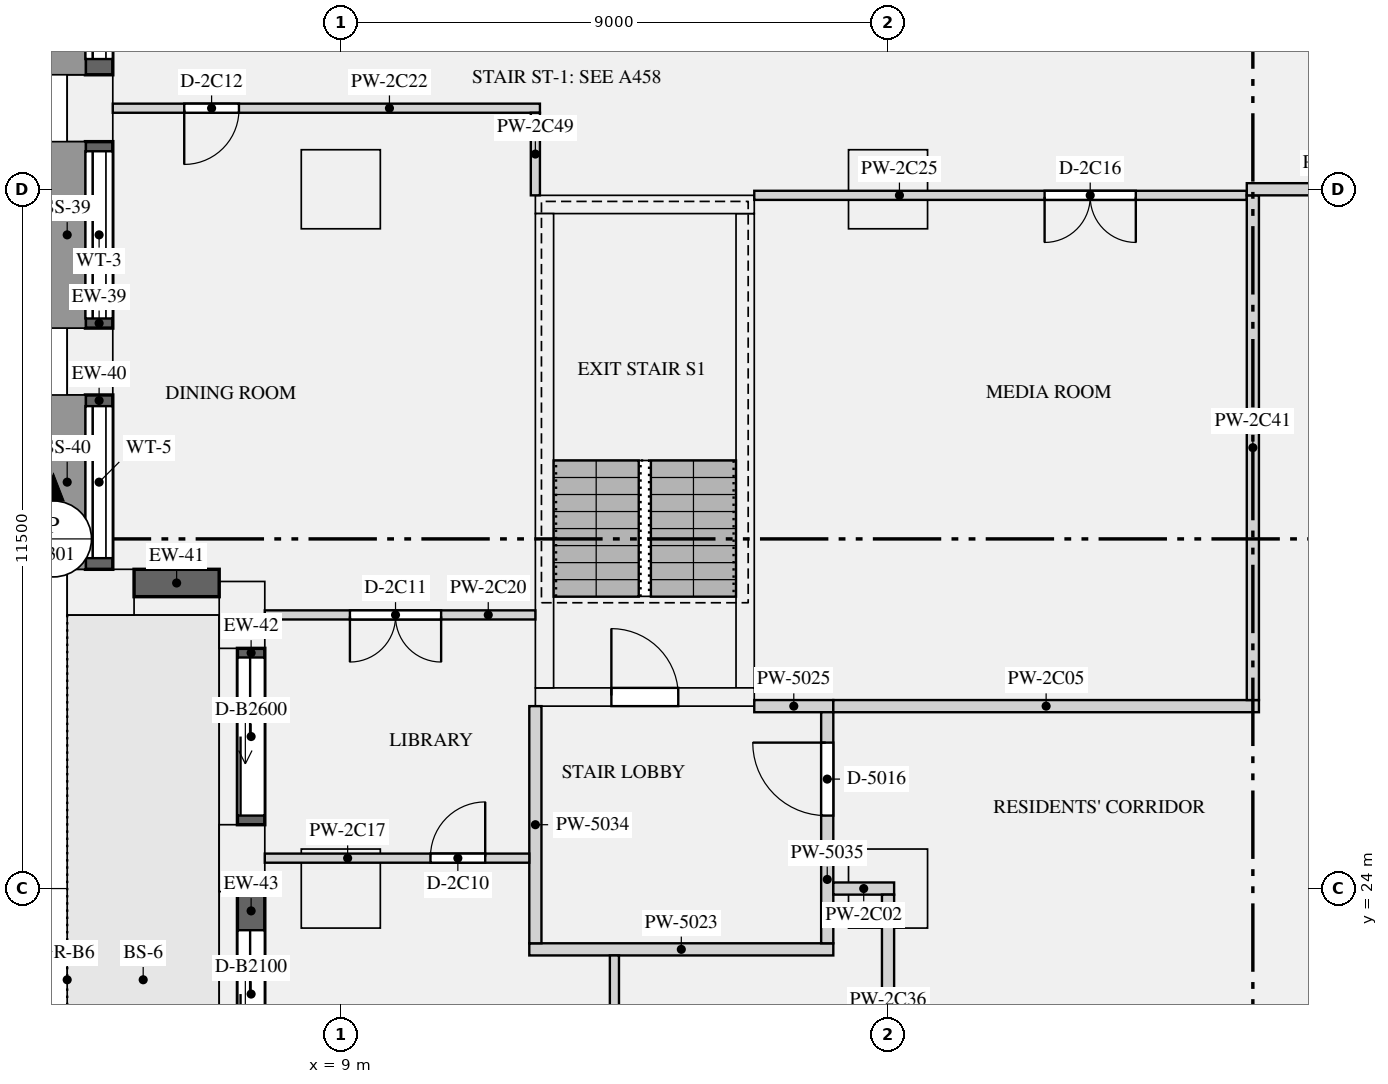
"""IFC4 building model, lengths in metres.
Left out: names, types, materials, properties, quantities, classifications, styles, units other than length and angle.
Written with IfcOpenShell. Run it as: python <this file> out.ifc"""

import sys

from ifc_helpers import new_model, si_unit, direction, frame, frame_2d, origin, origin_2d, place, context, subcontext, project, spatial, rectangle, extrude, element, fill, save


model = new_model("IFC4")
c1 = context("Model", 3, precision=1e-05, world=origin(), true_north=direction((0.0, 1.0)))
c2 = subcontext(c1, "Body", "Model", "MODEL_VIEW")
j1 = project(units=[si_unit("LENGTHUNIT", "METRE"), si_unit("PLANEANGLEUNIT", "RADIAN")], contexts=[c1])
p1 = place(None, origin())
s1 = spatial("IfcSite", under=j1, at=p1, CompositionType="ELEMENT")
p2 = place(p1, origin())
s2 = spatial("IfcBuilding", under=s1, at=p2, CompositionType="ELEMENT")
p3 = place(p2, frame((0.0, 0.0, 102.45)))
s3 = spatial("IfcBuildingStorey", under=s2, at=p3, CompositionType="ELEMENT", Elevation=102.45)
for number, where, z_axis, x_axis in (
    (1, (4.875, 36.833, 0.0), (0.0, 0.0, 1.0), (0.0, -1.0, 0.0)),
    (2, (4.875, 32.667, 0.0), (0.0, 0.0, 1.0), (0.0, -1.0, 0.0)),
    (3, (5.05, 28.875, 0.0), (0.0, 0.0, 1.0), (1.0, 0.0, 0.0)),
    (4, (7.375, 28.5, 0.0), (0.0, 0.0, 1.0), (0.0, -1.0, 0.0)),
    (5, (7.375, 24.5, 0.0), (0.0, 0.0, 1.0), (0.0, -1.0, 0.0)),
):
    element("IfcColumn", number, at=place(p3, frame(where, z_axis=z_axis, x_axis=x_axis)), inside=s3, PredefinedType="USERDEFINED", context=c2, shape_type="SweptSolid", body=[
        extrude(rectangle(XDim=1.1, YDim=0.75, at=origin_2d()), origin(), (0.0, 0.0, 1.0), 3.15),
    ])
for number, where, z_axis, x_axis in (
    (6, (9.0, 24.0, 0.0), (0.0, 0.0, 1.0), (1.0, 0.0, 0.0)),
    (7, (18.0, 24.0, 0.0), (0.0, 0.0, 1.0), (1.0, 0.0, 0.0)),
    (8, (9.0, 35.5, 0.0), (0.0, 0.0, 1.0), (1.0, 0.0, 0.0)),
    (9, (18.0, 35.5, 0.0), (0.0, 0.0, 1.0), (1.0, 0.0, 0.0)),
):
    element("IfcColumn", number, at=place(p3, frame(where, z_axis=z_axis, x_axis=x_axis)), inside=s3, PredefinedType="COLUMN", context=c2, shape_type="SweptSolid", body=[
        extrude(rectangle(XDim=1.3, YDim=1.3, at=origin_2d()), origin(), (0.0, 0.0, 1.0), 3.15),
    ])
p4 = place(p3, frame((12.2, 27.15, 0.0), z_axis=(0.0, 0.0, 1.0), x_axis=(1.0, 0.0, 0.0)))
e10 = element("IfcWall", 10, at=p4, inside=s3, PredefinedType="SHEAR", context=c2, shape_type="SweptSolid", body=[
    extrude(rectangle(XDim=3.6, YDim=0.3, at=frame_2d((1.8, 0.0))), origin(), (0.0, 0.0, 1.0), 3.15),
])
p5 = place(p4, frame((1.25, 0.0, 0.0)))
e11 = element("IfcOpeningElement", 11, at=p5, cuts=e10, PredefinedType="OPENING", context=c2, shape_type="SweptSolid", body=[
    extrude(rectangle(XDim=1.1, YDim=2.1, at=frame_2d((0.55, 1.05))), frame((0.0, 0.16, 0.0), z_axis=(0.0, -1.0, 0.0), x_axis=(1.0, 0.0, 0.0)), (0.0, 0.0, 1.0), 0.32),
])
p6 = place(p3, frame((12.2, 35.25, 0.0), z_axis=(0.0, 0.0, 1.0), x_axis=(1.0, 0.0, 0.0)))
e12 = element("IfcWall", 12, at=p6, inside=s3, PredefinedType="SHEAR", context=c2, shape_type="SweptSolid", body=[
    extrude(rectangle(XDim=3.6, YDim=0.3, at=frame_2d((1.8, 0.0))), origin(), (0.0, 0.0, 1.0), 3.15),
])
for number, where, z_axis, x_axis in (
    (13, (12.35, 27.3, 0.0), (0.0, 0.0, 1.0), (0.0, 1.0, 0.0)),
    (14, (15.65, 27.3, 0.0), (0.0, 0.0, 1.0), (0.0, 1.0, 0.0)),
):
    element("IfcWall", number, at=place(p3, frame(where, z_axis=z_axis, x_axis=x_axis)), inside=s3, PredefinedType="SHEAR", context=c2, shape_type="SweptSolid", body=[
        extrude(rectangle(XDim=7.8, YDim=0.3, at=frame_2d((3.9, 0.0))), origin(), (0.0, 0.0, 1.0), 3.15),
    ])
p7 = place(p3, frame((5.025, 39.9, 0.9), z_axis=(0.0, 0.0, 1.0), x_axis=(0.0, -1.0, 0.0)))
e15 = element("IfcWall", 15, at=p7, inside=s3, PredefinedType="SOLIDWALL", context=c2, shape_type="SweptSolid", body=[
    extrude(rectangle(XDim=2.517, YDim=0.45, at=frame_2d((1.258, 0.0))), origin(), (0.0, 0.0, 1.0), 1.93),
])
p8 = place(p7, frame((0.259, 0.0, 0.15)))
e16 = element("IfcOpeningElement", 16, at=p8, cuts=e15, PredefinedType="OPENING", context=c2, shape_type="SweptSolid", body=[
    extrude(rectangle(XDim=2.0, YDim=1.5, at=frame_2d((1.0, 0.75))), frame((0.0, 0.235, 0.0), z_axis=(0.0, -1.0, 0.0), x_axis=(1.0, 0.0, 0.0)), (0.0, 0.0, 1.0), 0.47),
])
p9 = place(p3, frame((5.025, 36.283, 0.9), z_axis=(0.0, 0.0, 1.0), x_axis=(0.0, -1.0, 0.0)))
e17 = element("IfcWall", 17, at=p9, inside=s3, PredefinedType="SOLIDWALL", context=c2, shape_type="SweptSolid", body=[
    extrude(rectangle(XDim=3.066, YDim=0.45, at=frame_2d((1.533, 0.0))), origin(), (0.0, 0.0, 1.0), 1.93),
])
p10 = place(p9, frame((0.158, 0.0, 0.15)))
e18 = element("IfcOpeningElement", 18, at=p10, cuts=e17, PredefinedType="OPENING", context=c2, shape_type="SweptSolid", body=[
    extrude(rectangle(XDim=2.75, YDim=1.5, at=frame_2d((1.375, 0.75))), frame((0.0, 0.235, 0.0), z_axis=(0.0, -1.0, 0.0), x_axis=(1.0, 0.0, 0.0)), (0.0, 0.0, 1.0), 0.47),
])
p11 = place(p3, frame((5.025, 32.117, 0.9), z_axis=(0.0, 0.0, 1.0), x_axis=(0.0, -1.0, 0.0)))
e19 = element("IfcWall", 19, at=p11, inside=s3, PredefinedType="SOLIDWALL", context=c2, shape_type="SweptSolid", body=[
    extrude(rectangle(XDim=2.867, YDim=0.45, at=frame_2d((1.434, 0.0))), origin(), (0.0, 0.0, 1.0), 1.93),
])
p12 = place(p11, frame((0.184, 0.0, 0.15)))
e20 = element("IfcOpeningElement", 20, at=p12, cuts=e19, PredefinedType="OPENING", context=c2, shape_type="SweptSolid", body=[
    extrude(rectangle(XDim=2.5, YDim=1.5, at=frame_2d((1.25, 0.75))), frame((0.0, 0.235, 0.0), z_axis=(0.0, -1.0, 0.0), x_axis=(1.0, 0.0, 0.0)), (0.0, 0.0, 1.0), 0.47),
])
p13 = place(p3, frame((5.6, 29.025, 0.9), z_axis=(0.0, 0.0, 1.0), x_axis=(1.0, 0.0, 0.0)))
e21 = element("IfcWall", 21, at=p13, inside=s3, PredefinedType="SOLIDWALL", context=c2, shape_type="SweptSolid", body=[
    extrude(rectangle(XDim=1.4, YDim=0.45, at=frame_2d((0.7, 0.0))), origin(), (0.0, 0.0, 1.0), 1.93),
])
p14 = place(p3, frame((7.525, 27.95, 0.0), z_axis=(0.0, 0.0, 1.0), x_axis=(0.0, -1.0, 0.0)))
e22 = element("IfcWall", 22, at=p14, inside=s3, PredefinedType="SOLIDWALL", context=c2, shape_type="SweptSolid", body=[
    extrude(rectangle(XDim=2.9, YDim=0.45, at=frame_2d((1.45, 0.0))), origin(), (0.0, 0.0, 1.0), 2.83),
])
p15 = place(p14, frame((0.15, 0.0, 0.0)))
e23 = element("IfcOpeningElement", 23, at=p15, cuts=e22, PredefinedType="OPENING", context=c2, shape_type="SweptSolid", body=[
    extrude(rectangle(XDim=2.6, YDim=2.3, at=frame_2d((1.3, 1.15))), frame((0.0, 0.235, 0.0), z_axis=(0.0, -1.0, 0.0), x_axis=(1.0, 0.0, 0.0)), (0.0, 0.0, 1.0), 0.47),
])
p16 = place(p3, frame((7.525, 23.95, 0.0), z_axis=(0.0, 0.0, 1.0), x_axis=(0.0, -1.0, 0.0)))
e24 = element("IfcWall", 24, at=p16, inside=s3, PredefinedType="SOLIDWALL", context=c2, shape_type="SweptSolid", body=[
    extrude(rectangle(XDim=2.9, YDim=0.45, at=frame_2d((1.45, 0.0))), origin(), (0.0, 0.0, 1.0), 2.83),
])
p17 = place(p16, frame((0.635, 0.0, 0.0)))
e25 = element("IfcOpeningElement", 25, at=p17, cuts=e24, PredefinedType="OPENING", context=c2, shape_type="SweptSolid", body=[
    extrude(rectangle(XDim=2.1, YDim=2.3, at=frame_2d((1.05, 1.15))), frame((0.0, 0.235, 0.0), z_axis=(0.0, -1.0, 0.0), x_axis=(1.0, 0.0, 0.0)), (0.0, 0.0, 1.0), 0.47),
])
p18 = place(p3, frame((12.1, 23.0, 0.0), z_axis=(0.0, 0.0, 1.0), x_axis=(1.0, 0.0, 0.0)))
e26 = element("IfcWall", 26, at=p18, inside=s3, PredefinedType="PARTITIONING", context=c2, shape_type="SweptSolid", body=[
    extrude(rectangle(XDim=5.0, YDim=0.2, at=frame_2d((2.5, 0.0))), origin(), (0.0, 0.0, 1.0), 2.83),
])
p19 = place(p3, frame((15.8, 27.0, 0.0), z_axis=(0.0, 0.0, 1.0), x_axis=(1.0, 0.0, 0.0)))
e27 = element("IfcWall", 27, at=p19, inside=s3, PredefinedType="PARTITIONING", context=c2, shape_type="SweptSolid", body=[
    extrude(rectangle(XDim=1.3, YDim=0.2, at=frame_2d((0.65, 0.0))), origin(), (0.0, 0.0, 1.0), 2.83),
])
p20 = place(p3, frame((12.2, 23.1, 0.0), z_axis=(0.0, 0.0, 1.0), x_axis=(0.0, 1.0, 0.0)))
e28 = element("IfcWall", 28, at=p20, inside=s3, PredefinedType="PARTITIONING", context=c2, shape_type="SweptSolid", body=[
    extrude(rectangle(XDim=3.9, YDim=0.2, at=frame_2d((1.95, 0.0))), origin(), (0.0, 0.0, 1.0), 2.83),
])
p21 = place(p3, frame((17.0, 23.1, 0.0), z_axis=(0.0, 0.0, 1.0), x_axis=(0.0, 1.0, 0.0)))
e29 = element("IfcWall", 29, at=p21, inside=s3, PredefinedType="PARTITIONING", context=c2, shape_type="SweptSolid", body=[
    extrude(rectangle(XDim=3.8, YDim=0.2, at=frame_2d((1.9, 0.0))), origin(), (0.0, 0.0, 1.0), 2.83),
])
p22 = place(p21, frame((2.1, 0.0, 0.0)))
e30 = element("IfcOpeningElement", 30, at=p22, cuts=e29, PredefinedType="OPENING", context=c2, shape_type="SweptSolid", body=[
    extrude(rectangle(XDim=1.2, YDim=2.1, at=frame_2d((0.6, 1.05))), frame((0.0, 0.11, 0.0), z_axis=(0.0, -1.0, 0.0), x_axis=(1.0, 0.0, 0.0)), (0.0, 0.0, 1.0), 0.22),
])
p23 = place(p3, frame((17.1, 24.0, 0.0), z_axis=(0.0, 0.0, 1.0), x_axis=(1.0, 0.0, 0.0)))
e31 = element("IfcWall", 31, at=p23, inside=s3, PredefinedType="PARTITIONING", context=c2, shape_type="SweptSolid", body=[
    extrude(rectangle(XDim=1.0, YDim=0.2, at=frame_2d((0.5, 0.0))), origin(), (0.0, 0.0, 1.0), 2.83),
])
p24 = place(p3, frame((17.1, 27.0, 0.0), z_axis=(0.0, 0.0, 1.0), x_axis=(1.0, 0.0, 0.0)))
e32 = element("IfcWall", 32, at=p24, inside=s3, PredefinedType="PARTITIONING", context=c2, shape_type="SweptSolid", body=[
    extrude(rectangle(XDim=7.0, YDim=0.2, at=frame_2d((3.5, 0.0))), origin(), (0.0, 0.0, 1.0), 2.83),
])
p25 = place(p3, frame((23.9, 35.5, 0.0), z_axis=(0.0, 0.0, 1.0), x_axis=(1.0, 0.0, 0.0)))
e33 = element("IfcWall", 33, at=p25, inside=s3, PredefinedType="PARTITIONING", context=c2, shape_type="SweptSolid", body=[
    extrude(rectangle(XDim=3.1, YDim=0.2, at=frame_2d((1.55, 0.0))), origin(), (0.0, 0.0, 1.0), 2.83),
])
p26 = place(p3, frame((7.75, 24.5, 0.0), z_axis=(0.0, 0.0, 1.0), x_axis=(1.0, 0.0, 0.0)))
e34 = element("IfcWall", 34, at=p26, inside=s3, PredefinedType="PARTITIONING", context=c2, shape_type="SweptSolid", body=[
    extrude(rectangle(XDim=4.35, YDim=0.15, at=frame_2d((2.175, 0.0))), origin(), (0.0, 0.0, 1.0), 2.83),
])
p27 = place(p26, frame((2.725, 0.0, 0.0)))
e35 = element("IfcOpeningElement", 35, at=p27, cuts=e34, PredefinedType="OPENING", context=c2, shape_type="SweptSolid", body=[
    extrude(rectangle(XDim=0.9, YDim=2.1, at=frame_2d((0.45, 1.05))), frame((0.0, 0.085, 0.0), z_axis=(0.0, -1.0, 0.0), x_axis=(1.0, 0.0, 0.0)), (0.0, 0.0, 1.0), 0.17),
])
p28 = place(p3, frame((7.75, 28.5, 0.0), z_axis=(0.0, 0.0, 1.0), x_axis=(1.0, 0.0, 0.0)))
e36 = element("IfcWall", 36, at=p28, inside=s3, PredefinedType="PARTITIONING", context=c2, shape_type="SweptSolid", body=[
    extrude(rectangle(XDim=4.45, YDim=0.15, at=frame_2d((2.225, 0.0))), origin(), (0.0, 0.0, 1.0), 2.83),
])
p29 = place(p28, frame((1.4, 0.0, 0.0)))
e37 = element("IfcOpeningElement", 37, at=p29, cuts=e36, PredefinedType="OPENING", context=c2, shape_type="SweptSolid", body=[
    extrude(rectangle(XDim=1.5, YDim=2.1, at=frame_2d((0.75, 1.05))), frame((0.0, 0.085, 0.0), z_axis=(0.0, -1.0, 0.0), x_axis=(1.0, 0.0, 0.0)), (0.0, 0.0, 1.0), 0.17),
])
p30 = place(p3, frame((5.25, 36.833, 0.0), z_axis=(0.0, 0.0, 1.0), x_axis=(1.0, 0.0, 0.0)))
e38 = element("IfcWall", 38, at=p30, inside=s3, PredefinedType="PARTITIONING", context=c2, shape_type="SweptSolid", body=[
    extrude(rectangle(XDim=7.025, YDim=0.15, at=frame_2d((3.512, 0.0))), origin(), (0.0, 0.0, 1.0), 2.83),
])
p31 = place(p30, frame((1.175, 0.0, 0.0)))
e39 = element("IfcOpeningElement", 39, at=p31, cuts=e38, PredefinedType="OPENING", context=c2, shape_type="SweptSolid", body=[
    extrude(rectangle(XDim=0.9, YDim=2.1, at=frame_2d((0.45, 1.05))), frame((0.0, 0.085, 0.0), z_axis=(0.0, -1.0, 0.0), x_axis=(1.0, 0.0, 0.0)), (0.0, 0.0, 1.0), 0.17),
])
p32 = place(p3, frame((15.8, 35.4, 0.0), z_axis=(0.0, 0.0, 1.0), x_axis=(1.0, 0.0, 0.0)))
e40 = element("IfcWall", 40, at=p32, inside=s3, PredefinedType="PARTITIONING", context=c2, shape_type="SweptSolid", body=[
    extrude(rectangle(XDim=8.1, YDim=0.15, at=frame_2d((4.05, 0.0))), origin(), (0.0, 0.0, 1.0), 2.83),
])
p33 = place(p32, frame((4.775, 0.0, 0.0)))
e41 = element("IfcOpeningElement", 41, at=p33, cuts=e40, PredefinedType="OPENING", context=c2, shape_type="SweptSolid", body=[
    extrude(rectangle(XDim=1.5, YDim=2.1, at=frame_2d((0.75, 1.05))), frame((0.0, 0.085, 0.0), z_axis=(0.0, -1.0, 0.0), x_axis=(1.0, 0.0, 0.0)), (0.0, 0.0, 1.0), 0.17),
])
p34 = place(p3, frame((18.0, 16.1, 0.0), z_axis=(0.0, 0.0, 1.0), x_axis=(0.0, 1.0, 0.0)))
e42 = element("IfcWall", 42, at=p34, inside=s3, PredefinedType="PARTITIONING", context=c2, shape_type="SweptSolid", body=[
    extrude(rectangle(XDim=7.8, YDim=0.2, at=frame_2d((3.9, 0.0))), origin(), (0.0, 0.0, 1.0), 2.83),
])
p35 = place(p34, frame((2.35, 0.0, 0.0)))
e43 = element("IfcOpeningElement", 43, at=p35, cuts=e42, PredefinedType="OPENING", context=c2, shape_type="SweptSolid", body=[
    extrude(rectangle(XDim=1.1, YDim=2.1, at=frame_2d((0.55, 1.05))), frame((0.0, 0.11, 0.0), z_axis=(0.0, -1.0, 0.0), x_axis=(1.0, 0.0, 0.0)), (0.0, 0.0, 1.0), 0.22),
])
p36 = place(p3, frame((24.0, 27.1, 0.0), z_axis=(0.0, 0.0, 1.0), x_axis=(0.0, 1.0, 0.0)))
e44 = element("IfcWall", 44, at=p36, inside=s3, PredefinedType="PARTITIONING", context=c2, shape_type="SweptSolid", body=[
    extrude(rectangle(XDim=8.3, YDim=0.2, at=frame_2d((4.15, 0.0))), origin(), (0.0, 0.0, 1.0), 2.83),
])
p37 = place(p3, frame((13.5, 12.575, 0.0), z_axis=(0.0, 0.0, 1.0), x_axis=(0.0, 1.0, 0.0)))
e45 = element("IfcWall", 45, at=p37, inside=s3, PredefinedType="PARTITIONING", context=c2, shape_type="SweptSolid", body=[
    extrude(rectangle(XDim=10.325, YDim=0.15, at=frame_2d((5.163, 0.0))), origin(), (0.0, 0.0, 1.0), 2.83),
])
p38 = place(p37, frame((1.475, 0.0, 0.0)))
e46 = element("IfcOpeningElement", 46, at=p38, cuts=e45, PredefinedType="OPENING", context=c2, shape_type="SweptSolid", body=[
    extrude(rectangle(XDim=0.9, YDim=2.1, at=frame_2d((0.45, 1.05))), frame((0.0, 0.085, 0.0), z_axis=(0.0, -1.0, 0.0), x_axis=(1.0, 0.0, 0.0)), (0.0, 0.0, 1.0), 0.17),
])
p39 = place(p37, frame((6.45, 0.0, 0.0)))
e47 = element("IfcOpeningElement", 47, at=p39, cuts=e45, PredefinedType="OPENING", context=c2, shape_type="SweptSolid", body=[
    extrude(rectangle(XDim=1.5, YDim=2.1, at=frame_2d((0.75, 1.05))), frame((0.0, 0.085, 0.0), z_axis=(0.0, -1.0, 0.0), x_axis=(1.0, 0.0, 0.0)), (0.0, 0.0, 1.0), 0.17),
])
p40 = place(p3, frame((12.2, 35.4, 0.0), z_axis=(0.0, 0.0, 1.0), x_axis=(0.0, 1.0, 0.0)))
e48 = element("IfcWall", 48, at=p40, inside=s3, PredefinedType="PARTITIONING", context=c2, shape_type="SweptSolid", body=[
    extrude(rectangle(XDim=1.358, YDim=0.15, at=frame_2d((0.679, 0.0))), origin(), (0.0, 0.0, 1.0), 2.83),
])
p41 = place(p8, origin())
e49 = element("IfcWindow", 49, at=p41, inside=s3, PartitioningType="SINGLE_PANEL", PredefinedType="WINDOW", context=c2, shape_type="SweptSolid", body=[
    extrude(rectangle(XDim=2.0, YDim=1.5, at=frame_2d((1.0, 0.75))), frame((0.0, -0.065, 0.0), z_axis=(0.0, -1.0, 0.0), x_axis=(1.0, 0.0, 0.0)), (0.0, 0.0, 1.0), 0.06),
])
fill(e16, e49)
p42 = place(p10, origin())
e50 = element("IfcWindow", 50, at=p42, inside=s3, PartitioningType="SINGLE_PANEL", PredefinedType="WINDOW", context=c2, shape_type="SweptSolid", body=[
    extrude(rectangle(XDim=2.75, YDim=1.5, at=frame_2d((1.375, 0.75))), frame((0.0, -0.065, 0.0), z_axis=(0.0, -1.0, 0.0), x_axis=(1.0, 0.0, 0.0)), (0.0, 0.0, 1.0), 0.06),
])
fill(e18, e50)
p43 = place(p12, origin())
e51 = element("IfcWindow", 51, at=p43, inside=s3, PartitioningType="SINGLE_PANEL", PredefinedType="WINDOW", context=c2, shape_type="SweptSolid", body=[
    extrude(rectangle(XDim=2.5, YDim=1.5, at=frame_2d((1.25, 0.75))), frame((0.0, -0.065, 0.0), z_axis=(0.0, -1.0, 0.0), x_axis=(1.0, 0.0, 0.0)), (0.0, 0.0, 1.0), 0.06),
])
fill(e20, e51)
p44 = place(p15, origin())
e52 = element("IfcDoor", 52, at=p44, inside=s3, OperationType="SLIDING_TO_LEFT", PredefinedType="DOOR", context=c2, shape_type="SweptSolid", body=[
    extrude(rectangle(XDim=2.6, YDim=2.3, at=frame_2d((1.3, 1.15))), frame((0.0, -0.07, 0.0), z_axis=(0.0, -1.0, 0.0), x_axis=(1.0, 0.0, 0.0)), (0.0, 0.0, 1.0), 0.05),
])
fill(e23, e52)
p45 = place(p17, origin())
e53 = element("IfcDoor", 53, at=p45, inside=s3, OperationType="SLIDING_TO_LEFT", PredefinedType="DOOR", context=c2, shape_type="SweptSolid", body=[
    extrude(rectangle(XDim=2.1, YDim=2.3, at=frame_2d((1.05, 1.15))), frame((0.0, -0.07, 0.0), z_axis=(0.0, -1.0, 0.0), x_axis=(1.0, 0.0, 0.0)), (0.0, 0.0, 1.0), 0.05),
])
fill(e25, e53)
p46 = place(p5, origin())
e54 = element("IfcDoor", 54, at=p46, inside=s3, OperationType="SINGLE_SWING_LEFT", PredefinedType="DOOR", context=c2, shape_type="SweptSolid", body=[
    extrude(rectangle(XDim=1.1, YDim=2.1, at=frame_2d((0.55, 1.05))), frame((0.0, 0.025, 0.0), z_axis=(0.0, -1.0, 0.0), x_axis=(1.0, 0.0, 0.0)), (0.0, 0.0, 1.0), 0.05),
])
fill(e11, e54)
p47 = place(p22, origin())
e55 = element("IfcDoor", 55, at=p47, inside=s3, OperationType="SINGLE_SWING_RIGHT", PredefinedType="DOOR", context=c2, shape_type="SweptSolid", body=[
    extrude(rectangle(XDim=1.2, YDim=2.1, at=frame_2d((0.6, 1.05))), frame((0.0, 0.025, 0.0), z_axis=(0.0, -1.0, 0.0), x_axis=(1.0, 0.0, 0.0)), (0.0, 0.0, 1.0), 0.05),
])
fill(e30, e55)
p48 = place(p27, origin())
e56 = element("IfcDoor", 56, at=p48, inside=s3, OperationType="SINGLE_SWING_RIGHT", PredefinedType="DOOR", context=c2, shape_type="SweptSolid", body=[
    extrude(rectangle(XDim=0.9, YDim=2.1, at=frame_2d((0.45, 1.05))), frame((0.0, 0.025, 0.0), z_axis=(0.0, -1.0, 0.0), x_axis=(1.0, 0.0, 0.0)), (0.0, 0.0, 1.0), 0.05),
])
fill(e35, e56)
p49 = place(p29, frame((1.5, 0.0, 0.0), z_axis=(0.0, 0.0, 1.0), x_axis=(-1.0, 0.0, 0.0)))
e57 = element("IfcDoor", 57, at=p49, inside=s3, OperationType="DOUBLE_DOOR_SINGLE_SWING", PredefinedType="DOOR", context=c2, shape_type="SweptSolid", body=[
    extrude(rectangle(XDim=1.5, YDim=2.1, at=frame_2d((0.75, 1.05))), frame((0.0, 0.025, 0.0), z_axis=(0.0, -1.0, 0.0), x_axis=(1.0, 0.0, 0.0)), (0.0, 0.0, 1.0), 0.05),
])
fill(e37, e57)
p50 = place(p31, frame((0.9, 0.0, 0.0), z_axis=(0.0, 0.0, 1.0), x_axis=(-1.0, 0.0, 0.0)))
e58 = element("IfcDoor", 58, at=p50, inside=s3, OperationType="SINGLE_SWING_RIGHT", PredefinedType="DOOR", context=c2, shape_type="SweptSolid", body=[
    extrude(rectangle(XDim=0.9, YDim=2.1, at=frame_2d((0.45, 1.05))), frame((0.0, 0.025, 0.0), z_axis=(0.0, -1.0, 0.0), x_axis=(1.0, 0.0, 0.0)), (0.0, 0.0, 1.0), 0.05),
])
fill(e39, e58)
p51 = place(p33, frame((1.5, 0.0, 0.0), z_axis=(0.0, 0.0, 1.0), x_axis=(-1.0, 0.0, 0.0)))
e59 = element("IfcDoor", 59, at=p51, inside=s3, OperationType="DOUBLE_DOOR_SINGLE_SWING", PredefinedType="DOOR", context=c2, shape_type="SweptSolid", body=[
    extrude(rectangle(XDim=1.5, YDim=2.1, at=frame_2d((0.75, 1.05))), frame((0.0, 0.025, 0.0), z_axis=(0.0, -1.0, 0.0), x_axis=(1.0, 0.0, 0.0)), (0.0, 0.0, 1.0), 0.05),
])
fill(e41, e59)
save(model, sys.argv[1])
